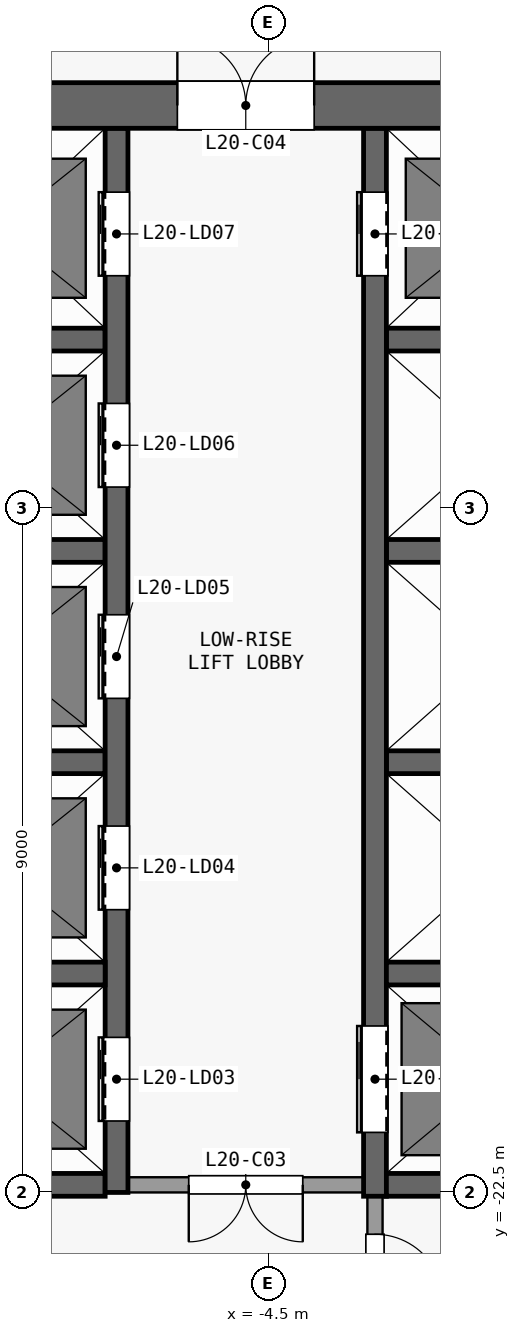
"""IFC4 building model, lengths in metres.
Left out: names, types, materials, properties, quantities, classifications, styles, units other than length and angle.
Written with IfcOpenShell. Run it as: python <this file> out.ifc"""

import sys

from ifc_helpers import new_model, si_unit, direction, frame, frame_2d, origin, place, context, subcontext, project, spatial, rectangle, extrude, element, fill, save


model = new_model("IFC4")
c1 = context("Model", 3, precision=1e-05, world=origin(), true_north=direction((0.0, 1.0)))
c2 = subcontext(c1, "Body", "Model", "MODEL_VIEW")
j1 = project(units=[si_unit("LENGTHUNIT", "METRE"), si_unit("PLANEANGLEUNIT", "RADIAN")], contexts=[c1])
p1 = place(None, origin())
s1 = spatial("IfcSite", under=j1, at=p1, CompositionType="ELEMENT")
p2 = place(p1, origin())
s2 = spatial("IfcBuilding", under=s1, at=p2, CompositionType="ELEMENT")
p3 = place(p2, frame((0.0, 0.0, 84.7)))
s3 = spatial("IfcBuildingStorey", under=s2, at=p3, CompositionType="ELEMENT", Elevation=84.7)
p4 = place(p3, frame((-13.4, -8.2, 0.0), z_axis=(0.0, 0.0, 1.0), x_axis=(1.0, 0.0, 0.0)))
e1 = element("IfcWall", 1, at=p4, inside=s3, PredefinedType="SHEAR", context=c2, shape_type="SweptSolid", body=[
    extrude(rectangle(XDim=26.8, YDim=0.6, at=frame_2d((13.4, 0.0))), origin(), (0.0, 0.0, 1.0), 3.3),
])
p5 = place(p4, frame((7.7, 0.0, 0.0)))
e2 = element("IfcOpeningElement", 2, at=p5, cuts=e1, PredefinedType="OPENING", context=c2, shape_type="SweptSolid", body=[
    extrude(rectangle(XDim=1.8, YDim=2.1, at=frame_2d((0.9, 1.05))), frame((0.0, 0.31, 0.0), z_axis=(0.0, -1.0, 0.0), x_axis=(1.0, 0.0, 0.0)), (0.0, 0.0, 1.0), 0.62),
])
p6 = place(p4, frame((17.3, 0.0, 0.0)))
e3 = element("IfcOpeningElement", 3, at=p6, cuts=e1, PredefinedType="OPENING", context=c2, shape_type="SweptSolid", body=[
    extrude(rectangle(XDim=1.8, YDim=2.1, at=frame_2d((0.9, 1.05))), frame((0.0, 0.31, 0.0), z_axis=(0.0, -1.0, 0.0), x_axis=(1.0, 0.0, 0.0)), (0.0, 0.0, 1.0), 0.62),
])
p7 = place(p4, frame((2.625, 0.0, 0.0)))
e4 = element("IfcOpeningElement", 4, at=p7, cuts=e1, PredefinedType="OPENING", context=c2, shape_type="SweptSolid", body=[
    extrude(rectangle(XDim=0.9, YDim=2.1, at=frame_2d((0.45, 1.05))), frame((0.0, 0.31, 0.0), z_axis=(0.0, -1.0, 0.0), x_axis=(1.0, 0.0, 0.0)), (0.0, 0.0, 1.0), 0.62),
])
p8 = place(p4, frame((23.275, 0.0, 0.0)))
e5 = element("IfcOpeningElement", 5, at=p8, cuts=e1, PredefinedType="OPENING", context=c2, shape_type="SweptSolid", body=[
    extrude(rectangle(XDim=0.9, YDim=2.1, at=frame_2d((0.45, 1.05))), frame((0.0, 0.31, 0.0), z_axis=(0.0, -1.0, 0.0), x_axis=(1.0, 0.0, 0.0)), (0.0, 0.0, 1.0), 0.62),
])
p9 = place(p3, frame((-9.45, -22.4, 0.0), z_axis=(0.0, 0.0, 1.0), x_axis=(1.0, 0.0, 0.0)))
e6 = element("IfcWall", 6, at=p9, inside=s3, PredefinedType="SHEAR", context=c2, shape_type="SweptSolid", body=[
    extrude(rectangle(XDim=2.8, YDim=0.3, at=frame_2d((1.4, 0.0))), origin(), (0.0, 0.0, 1.0), 3.3),
])
p10 = place(p3, frame((-3.25, -22.4, 0.0), z_axis=(0.0, 0.0, 1.0), x_axis=(-1.0, 0.0, 0.0)))
e7 = element("IfcWall", 7, at=p10, inside=s3, PredefinedType="PARTITIONING", context=c2, shape_type="SweptSolid", body=[
    extrude(rectangle(XDim=3.1, YDim=0.2, at=frame_2d((1.55, 0.0))), origin(), (0.0, 0.0, 1.0), 3.3),
])
p11 = place(p10, frame((0.8, 0.0, 0.0)))
e8 = element("IfcOpeningElement", 8, at=p11, cuts=e7, PredefinedType="OPENING", context=c2, shape_type="SweptSolid", body=[
    extrude(rectangle(XDim=1.5, YDim=2.1, at=frame_2d((0.75, 1.05))), frame((0.0, 0.11, 0.0), z_axis=(0.0, -1.0, 0.0), x_axis=(1.0, 0.0, 0.0)), (0.0, 0.0, 1.0), 0.22),
])
p12 = place(p3, frame((-2.95, -22.4, 0.0), z_axis=(0.0, 0.0, 1.0), x_axis=(1.0, 0.0, 0.0)))
e9 = element("IfcWall", 9, at=p12, inside=s3, PredefinedType="SHEAR", context=c2, shape_type="SweptSolid", body=[
    extrude(rectangle(XDim=6.2, YDim=0.3, at=frame_2d((3.1, 0.0))), origin(), (0.0, 0.0, 1.0), 3.3),
])
for number, where, z_axis, x_axis in (
    (10, (-9.45, -19.62, 0.0), (0.0, 0.0, 1.0), (1.0, 0.0, 0.0)),
    (11, (-2.95, -19.62, 0.0), (0.0, 0.0, 1.0), (1.0, 0.0, 0.0)),
    (12, (-9.45, -16.84, 0.0), (0.0, 0.0, 1.0), (1.0, 0.0, 0.0)),
    (13, (-2.95, -16.84, 0.0), (0.0, 0.0, 1.0), (1.0, 0.0, 0.0)),
    (14, (-9.45, -14.06, 0.0), (0.0, 0.0, 1.0), (1.0, 0.0, 0.0)),
    (15, (-2.95, -14.06, 0.0), (0.0, 0.0, 1.0), (1.0, 0.0, 0.0)),
    (16, (-9.45, -11.28, 0.0), (0.0, 0.0, 1.0), (1.0, 0.0, 0.0)),
    (17, (-2.95, -11.28, 0.0), (0.0, 0.0, 1.0), (1.0, 0.0, 0.0)),
):
    element("IfcWall", number, at=place(p3, frame(where, z_axis=z_axis, x_axis=x_axis)), inside=s3, PredefinedType="SHEAR", context=c2, shape_type="SweptSolid", body=[
        extrude(rectangle(XDim=2.8, YDim=0.3, at=frame_2d((1.4, 0.0))), origin(), (0.0, 0.0, 1.0), 3.3),
    ])
p13 = place(p3, frame((-6.5, -22.5, 0.0), z_axis=(0.0, 0.0, 1.0), x_axis=(0.0, 1.0, 0.0)))
e18 = element("IfcWall", 18, at=p13, inside=s3, PredefinedType="SHEAR", context=c2, shape_type="SweptSolid", body=[
    extrude(rectangle(XDim=14.0, YDim=0.3, at=frame_2d((7.0, 0.0))), origin(), (0.0, 0.0, 1.0), 3.3),
])
p14 = place(p13, frame((0.94, 0.0, 0.0)))
e19 = element("IfcOpeningElement", 19, at=p14, cuts=e18, PredefinedType="OPENING", context=c2, shape_type="SweptSolid", body=[
    extrude(rectangle(XDim=1.1, YDim=2.1, at=frame_2d((0.55, 1.05))), frame((0.0, 0.16, 0.0), z_axis=(0.0, -1.0, 0.0), x_axis=(1.0, 0.0, 0.0)), (0.0, 0.0, 1.0), 0.32),
])
p15 = place(p13, frame((3.72, 0.0, 0.0)))
e20 = element("IfcOpeningElement", 20, at=p15, cuts=e18, PredefinedType="OPENING", context=c2, shape_type="SweptSolid", body=[
    extrude(rectangle(XDim=1.1, YDim=2.1, at=frame_2d((0.55, 1.05))), frame((0.0, 0.16, 0.0), z_axis=(0.0, -1.0, 0.0), x_axis=(1.0, 0.0, 0.0)), (0.0, 0.0, 1.0), 0.32),
])
p16 = place(p13, frame((6.5, 0.0, 0.0)))
e21 = element("IfcOpeningElement", 21, at=p16, cuts=e18, PredefinedType="OPENING", context=c2, shape_type="SweptSolid", body=[
    extrude(rectangle(XDim=1.1, YDim=2.1, at=frame_2d((0.55, 1.05))), frame((0.0, 0.16, 0.0), z_axis=(0.0, -1.0, 0.0), x_axis=(1.0, 0.0, 0.0)), (0.0, 0.0, 1.0), 0.32),
])
p17 = place(p13, frame((9.28, 0.0, 0.0)))
e22 = element("IfcOpeningElement", 22, at=p17, cuts=e18, PredefinedType="OPENING", context=c2, shape_type="SweptSolid", body=[
    extrude(rectangle(XDim=1.1, YDim=2.1, at=frame_2d((0.55, 1.05))), frame((0.0, 0.16, 0.0), z_axis=(0.0, -1.0, 0.0), x_axis=(1.0, 0.0, 0.0)), (0.0, 0.0, 1.0), 0.32),
])
p18 = place(p13, frame((12.06, 0.0, 0.0)))
e23 = element("IfcOpeningElement", 23, at=p18, cuts=e18, PredefinedType="OPENING", context=c2, shape_type="SweptSolid", body=[
    extrude(rectangle(XDim=1.1, YDim=2.1, at=frame_2d((0.55, 1.05))), frame((0.0, 0.16, 0.0), z_axis=(0.0, -1.0, 0.0), x_axis=(1.0, 0.0, 0.0)), (0.0, 0.0, 1.0), 0.32),
])
p19 = place(p3, frame((-3.1, -22.55, 0.0), z_axis=(0.0, 0.0, 1.0), x_axis=(0.0, -1.0, 0.0)))
e24 = element("IfcWall", 24, at=p19, inside=s3, PredefinedType="PARTITIONING", context=c2, shape_type="SweptSolid", body=[
    extrude(rectangle(XDim=2.05, YDim=0.2, at=frame_2d((1.025, 0.0))), origin(), (0.0, 0.0, 1.0), 3.3),
])
p20 = place(p19, frame((0.5, 0.0, 0.0)))
e25 = element("IfcOpeningElement", 25, at=p20, cuts=e24, PredefinedType="OPENING", context=c2, shape_type="SweptSolid", body=[
    extrude(rectangle(XDim=0.9, YDim=2.1, at=frame_2d((0.45, 1.05))), frame((0.0, 0.11, 0.0), z_axis=(0.0, -1.0, 0.0), x_axis=(1.0, 0.0, 0.0)), (0.0, 0.0, 1.0), 0.22),
])
p21 = place(p3, frame((-3.1, -22.55, 0.0), z_axis=(0.0, 0.0, 1.0), x_axis=(0.0, 1.0, 0.0)))
e26 = element("IfcWall", 26, at=p21, inside=s3, PredefinedType="SHEAR", context=c2, shape_type="SweptSolid", body=[
    extrude(rectangle(XDim=14.05, YDim=0.3, at=frame_2d((7.025, 0.0))), origin(), (0.0, 0.0, 1.0), 3.3),
])
p22 = place(p21, frame((12.11, 0.0, 0.0)))
e27 = element("IfcOpeningElement", 27, at=p22, cuts=e26, PredefinedType="OPENING", context=c2, shape_type="SweptSolid", body=[
    extrude(rectangle(XDim=1.1, YDim=2.1, at=frame_2d((0.55, 1.05))), frame((0.0, 0.16, 0.0), z_axis=(0.0, -1.0, 0.0), x_axis=(1.0, 0.0, 0.0)), (0.0, 0.0, 1.0), 0.32),
])
p23 = place(p21, frame((0.84, 0.0, 0.0)))
e28 = element("IfcOpeningElement", 28, at=p23, cuts=e26, PredefinedType="OPENING", context=c2, shape_type="SweptSolid", body=[
    extrude(rectangle(XDim=1.4, YDim=2.1, at=frame_2d((0.7, 1.05))), frame((0.0, 0.16, 0.0), z_axis=(0.0, -1.0, 0.0), x_axis=(1.0, 0.0, 0.0)), (0.0, 0.0, 1.0), 0.32),
])
p24 = place(p14, origin())
e29 = element("IfcDoor", 29, at=p24, inside=s3, OperationType="DOUBLE_DOOR_SLIDING", PredefinedType="DOOR", context=c2, shape_type="SweptSolid", body=[
    extrude(rectangle(XDim=1.1, YDim=2.1, at=frame_2d((0.55, 1.05))), frame((0.0, 0.025, 0.0), z_axis=(0.0, -1.0, 0.0), x_axis=(1.0, 0.0, 0.0)), (0.0, 0.0, 1.0), 0.05),
])
fill(e19, e29)
p25 = place(p15, origin())
e30 = element("IfcDoor", 30, at=p25, inside=s3, OperationType="DOUBLE_DOOR_SLIDING", PredefinedType="DOOR", context=c2, shape_type="SweptSolid", body=[
    extrude(rectangle(XDim=1.1, YDim=2.1, at=frame_2d((0.55, 1.05))), frame((0.0, 0.025, 0.0), z_axis=(0.0, -1.0, 0.0), x_axis=(1.0, 0.0, 0.0)), (0.0, 0.0, 1.0), 0.05),
])
fill(e20, e30)
p26 = place(p16, origin())
e31 = element("IfcDoor", 31, at=p26, inside=s3, OperationType="DOUBLE_DOOR_SLIDING", PredefinedType="DOOR", context=c2, shape_type="SweptSolid", body=[
    extrude(rectangle(XDim=1.1, YDim=2.1, at=frame_2d((0.55, 1.05))), frame((0.0, 0.025, 0.0), z_axis=(0.0, -1.0, 0.0), x_axis=(1.0, 0.0, 0.0)), (0.0, 0.0, 1.0), 0.05),
])
fill(e21, e31)
p27 = place(p17, origin())
e32 = element("IfcDoor", 32, at=p27, inside=s3, OperationType="DOUBLE_DOOR_SLIDING", PredefinedType="DOOR", context=c2, shape_type="SweptSolid", body=[
    extrude(rectangle(XDim=1.1, YDim=2.1, at=frame_2d((0.55, 1.05))), frame((0.0, 0.025, 0.0), z_axis=(0.0, -1.0, 0.0), x_axis=(1.0, 0.0, 0.0)), (0.0, 0.0, 1.0), 0.05),
])
fill(e22, e32)
p28 = place(p18, origin())
e33 = element("IfcDoor", 33, at=p28, inside=s3, OperationType="DOUBLE_DOOR_SLIDING", PredefinedType="DOOR", context=c2, shape_type="SweptSolid", body=[
    extrude(rectangle(XDim=1.1, YDim=2.1, at=frame_2d((0.55, 1.05))), frame((0.0, 0.025, 0.0), z_axis=(0.0, -1.0, 0.0), x_axis=(1.0, 0.0, 0.0)), (0.0, 0.0, 1.0), 0.05),
])
fill(e23, e33)
p29 = place(p22, origin())
e34 = element("IfcDoor", 34, at=p29, inside=s3, OperationType="DOUBLE_DOOR_SLIDING", PredefinedType="DOOR", context=c2, shape_type="SweptSolid", body=[
    extrude(rectangle(XDim=1.1, YDim=2.1, at=frame_2d((0.55, 1.05))), frame((0.0, 0.025, 0.0), z_axis=(0.0, -1.0, 0.0), x_axis=(1.0, 0.0, 0.0)), (0.0, 0.0, 1.0), 0.05),
])
fill(e27, e34)
p30 = place(p23, origin())
e35 = element("IfcDoor", 35, at=p30, inside=s3, OperationType="DOUBLE_DOOR_SLIDING", PredefinedType="DOOR", context=c2, shape_type="SweptSolid", body=[
    extrude(rectangle(XDim=1.4, YDim=2.1, at=frame_2d((0.7, 1.05))), frame((0.0, 0.025, 0.0), z_axis=(0.0, -1.0, 0.0), x_axis=(1.0, 0.0, 0.0)), (0.0, 0.0, 1.0), 0.05),
])
fill(e28, e35)
p31 = place(p11, origin())
e36 = element("IfcDoor", 36, at=p31, inside=s3, OperationType="DOUBLE_DOOR_SINGLE_SWING", PredefinedType="DOOR", context=c2, shape_type="SweptSolid", body=[
    extrude(rectangle(XDim=1.5, YDim=2.1, at=frame_2d((0.75, 1.05))), frame((0.0, 0.025, 0.0), z_axis=(0.0, -1.0, 0.0), x_axis=(1.0, 0.0, 0.0)), (0.0, 0.0, 1.0), 0.05),
])
fill(e8, e36)
p32 = place(p5, origin())
e37 = element("IfcDoor", 37, at=p32, inside=s3, OperationType="DOUBLE_DOOR_SINGLE_SWING", PredefinedType="DOOR", context=c2, shape_type="SweptSolid", body=[
    extrude(rectangle(XDim=1.8, YDim=2.1, at=frame_2d((0.9, 1.05))), frame((0.0, 0.025, 0.0), z_axis=(0.0, -1.0, 0.0), x_axis=(1.0, 0.0, 0.0)), (0.0, 0.0, 1.0), 0.05),
])
fill(e2, e37)
p33 = place(p20, origin())
e38 = element("IfcDoor", 38, at=p33, inside=s3, OperationType="SINGLE_SWING_RIGHT", PredefinedType="DOOR", context=c2, shape_type="SweptSolid", body=[
    extrude(rectangle(XDim=0.9, YDim=2.1, at=frame_2d((0.45, 1.05))), frame((0.0, 0.025, 0.0), z_axis=(0.0, -1.0, 0.0), x_axis=(1.0, 0.0, 0.0)), (0.0, 0.0, 1.0), 0.05),
])
fill(e25, e38)
save(model, sys.argv[1])
